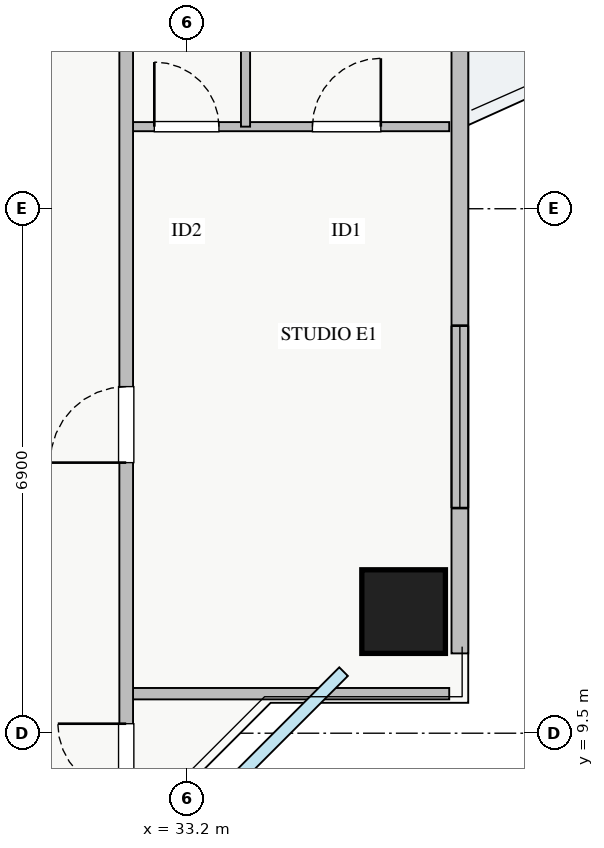
"""IFC4 building model, lengths in metres.
Left out: names, types, materials, properties, quantities, classifications, styles, units other than length and angle.
Written with IfcOpenShell. Run it as: python <this file> out.ifc"""

import sys

from ifc_helpers import new_model, si_unit, direction, frame, frame_2d, origin, origin_2d, place, context, subcontext, project, spatial, rectangle, extrude, source, transform, mapped, element, fill, save


model = new_model("IFC4")
c1 = context("Model", 3, precision=1e-05, world=origin(), true_north=direction((0.0, 1.0)))
c2 = subcontext(c1, "Body", "Model", "MODEL_VIEW")
j1 = project(units=[si_unit("LENGTHUNIT", "METRE"), si_unit("PLANEANGLEUNIT", "RADIAN")], contexts=[c1])
p1 = place(None, origin())
s1 = spatial("IfcSite", under=j1, at=p1, CompositionType="ELEMENT")
p2 = place(p1, origin())
s2 = spatial("IfcBuilding", under=s1, at=p2, CompositionType="ELEMENT")
p3 = place(p2, frame((0.0, 0.0, 136.0)))
s3 = spatial("IfcBuildingStorey", under=s2, at=p3, CompositionType="ELEMENT", Elevation=136.0)
m1 = source(origin(), c2, "Body", "SweptSolid", [
    extrude(rectangle(XDim=1.1, YDim=1.1, at=origin_2d()), origin(), (0.0, 0.0, 1.0), 3.25),
])
p4 = place(p3, frame((36.05, 11.1, 0.0), z_axis=(0.0, 0.0, 1.0), x_axis=(1.0, 0.0, 0.0)))
e1 = element("IfcColumn", 1, at=p4, inside=s3, PredefinedType="COLUMN", context=c2, shape_type="MappedRepresentation", body=[
    mapped(m1, transform((0.0, 0.0, 0.0), x_axis=(1.0, 0.0, 0.0), y_axis=(0.0, 1.0, 0.0), z_axis=(0.0, 0.0, 1.0), scale=1.0)),
])
p5 = place(p3, frame((36.79, 10.55, 0.0), z_axis=(0.0, 0.0, 1.0), x_axis=(0.0, 1.0, 0.0)))
e2 = element("IfcWall", 2, at=p5, inside=s3, PredefinedType="STANDARD", context=c2, shape_type="SweptSolid", body=[
    extrude(rectangle(XDim=24.9, YDim=0.22, at=frame_2d((12.45, 0.0))), origin(), (0.0, 0.0, 1.0), 2.57),
])
p6 = place(p5, frame((13.3, 0.0, 0.0)))
e3 = element("IfcOpeningElement", 3, at=p6, cuts=e2, PredefinedType="OPENING", context=c2, shape_type="SweptSolid", body=[
    extrude(rectangle(XDim=1.2, YDim=2.1, at=frame_2d((0.6, 1.05))), frame((0.0, 0.12, 0.0), z_axis=(0.0, -1.0, 0.0), x_axis=(1.0, 0.0, 0.0)), (0.0, 0.0, 1.0), 0.24),
])
p7 = place(p5, frame((1.912, 0.0, 0.9)))
e4 = element("IfcOpeningElement", 4, at=p7, cuts=e2, PredefinedType="OPENING", context=c2, shape_type="SweptSolid", body=[
    extrude(rectangle(XDim=2.4, YDim=1.48, at=frame_2d((1.2, 0.74))), frame((0.0, 0.12, 0.0), z_axis=(0.0, -1.0, 0.0), x_axis=(1.0, 0.0, 0.0)), (0.0, 0.0, 1.0), 0.24),
])
p8 = place(p5, frame((20.737, 0.0, 0.9)))
e5 = element("IfcOpeningElement", 5, at=p8, cuts=e2, PredefinedType="OPENING", context=c2, shape_type="SweptSolid", body=[
    extrude(rectangle(XDim=2.1, YDim=1.48, at=frame_2d((1.05, 0.74))), frame((0.0, 0.12, 0.0), z_axis=(0.0, -1.0, 0.0), x_axis=(1.0, 0.0, 0.0)), (0.0, 0.0, 1.0), 0.24),
])
p9 = place(p5, frame((14.72, 0.0, 0.9)))
e6 = element("IfcOpeningElement", 6, at=p9, cuts=e2, PredefinedType="OPENING", context=c2, shape_type="SweptSolid", body=[
    extrude(rectangle(XDim=0.9, YDim=1.2, at=frame_2d((0.45, 0.6))), frame((0.0, 0.12, 0.0), z_axis=(0.0, -1.0, 0.0), x_axis=(1.0, 0.0, 0.0)), (0.0, 0.0, 1.0), 0.24),
])
p10 = place(p3, frame((32.4, 10.02, 0.0), z_axis=(0.0, 0.0, 1.0), x_axis=(1.0, 0.0, 0.0)))
e7 = element("IfcWall", 7, at=p10, inside=s3, PredefinedType="PARTITIONING", context=c2, shape_type="SweptSolid", body=[
    extrude(rectangle(XDim=4.25, YDim=0.15, at=frame_2d((2.125, 0.0))), origin(), (0.0, 0.0, 1.0), 3.03),
])
p11 = place(p3, frame((32.4, 17.48, 0.0), z_axis=(0.0, 0.0, 1.0), x_axis=(1.0, 0.0, 0.0)))
e8 = element("IfcWall", 8, at=p11, inside=s3, PredefinedType="PLUMBINGWALL", context=c2, shape_type="SweptSolid", body=[
    extrude(rectangle(XDim=4.25, YDim=0.12, at=frame_2d((2.125, 0.0))), origin(), (0.0, 0.0, 1.0), 3.03),
])
p12 = place(p11, frame((0.37, 0.0, 0.0)))
e9 = element("IfcOpeningElement", 9, at=p12, cuts=e8, PredefinedType="OPENING", context=c2, shape_type="SweptSolid", body=[
    extrude(rectangle(XDim=0.85, YDim=2.05, at=frame_2d((0.425, 1.025))), frame((0.0, 0.07, 0.0), z_axis=(0.0, -1.0, 0.0), x_axis=(1.0, 0.0, 0.0)), (0.0, 0.0, 1.0), 0.14),
])
p13 = place(p11, frame((2.45, 0.0, 0.0)))
e10 = element("IfcOpeningElement", 10, at=p13, cuts=e8, PredefinedType="OPENING", context=c2, shape_type="SweptSolid", body=[
    extrude(rectangle(XDim=0.9, YDim=2.05, at=frame_2d((0.45, 1.025))), frame((0.0, 0.07, 0.0), z_axis=(0.0, -1.0, 0.0), x_axis=(1.0, 0.0, 0.0)), (0.0, 0.0, 1.0), 0.14),
])
p14 = place(p3, frame((33.97, 17.48, 0.0), z_axis=(0.0, 0.0, 1.0), x_axis=(0.0, 1.0, 0.0)))
e11 = element("IfcWall", 11, at=p14, inside=s3, PredefinedType="PLUMBINGWALL", context=c2, shape_type="SweptSolid", body=[
    extrude(rectangle(XDim=6.35, YDim=0.12, at=frame_2d((3.175, 0.0))), origin(), (0.0, 0.0, 1.0), 3.03),
])
p15 = place(p3, frame((32.4, 8.31, 0.0), z_axis=(0.0, 0.0, 1.0), x_axis=(0.0, 1.0, 0.0)))
e12 = element("IfcWall", 12, at=p15, inside=s3, PredefinedType="PARTITIONING", context=c2, shape_type="SweptSolid", body=[
    extrude(rectangle(XDim=29.13, YDim=0.18, at=frame_2d((14.565, 0.0))), origin(), (0.0, 0.0, 1.0), 3.03),
])
p16 = place(p15, frame((27.94, 0.0, 0.0)))
e13 = element("IfcOpeningElement", 13, at=p16, cuts=e12, PredefinedType="OPENING", context=c2, shape_type="SweptSolid", body=[
    extrude(rectangle(XDim=0.9, YDim=2.05, at=frame_2d((0.45, 1.025))), frame((0.0, 0.1, 0.0), z_axis=(0.0, -1.0, 0.0), x_axis=(1.0, 0.0, 0.0)), (0.0, 0.0, 1.0), 0.2),
])
p17 = place(p15, frame((0.415, 0.0, 0.0)))
e14 = element("IfcOpeningElement", 14, at=p17, cuts=e12, PredefinedType="OPENING", context=c2, shape_type="SweptSolid", body=[
    extrude(rectangle(XDim=0.9, YDim=2.05, at=frame_2d((0.45, 1.025))), frame((0.0, 0.1, 0.0), z_axis=(0.0, -1.0, 0.0), x_axis=(1.0, 0.0, 0.0)), (0.0, 0.0, 1.0), 0.2),
])
p18 = place(p15, frame((4.75, 0.0, 0.0)))
e15 = element("IfcOpeningElement", 15, at=p18, cuts=e12, PredefinedType="OPENING", context=c2, shape_type="SweptSolid", body=[
    extrude(rectangle(XDim=1.0, YDim=2.05, at=frame_2d((0.5, 1.025))), frame((0.0, 0.1, 0.0), z_axis=(0.0, -1.0, 0.0), x_axis=(1.0, 0.0, 0.0)), (0.0, 0.0, 1.0), 0.2),
])
p19 = place(p15, frame((18.11, 0.0, 0.0)))
e16 = element("IfcOpeningElement", 16, at=p19, cuts=e12, PredefinedType="OPENING", context=c2, shape_type="SweptSolid", body=[
    extrude(rectangle(XDim=1.0, YDim=2.05, at=frame_2d((0.5, 1.025))), frame((0.0, 0.1, 0.0), z_axis=(0.0, -1.0, 0.0), x_axis=(1.0, 0.0, 0.0)), (0.0, 0.0, 1.0), 0.2),
])
m2 = source(origin(), c2, "Body", "SweptSolid", [
    extrude(rectangle(XDim=2.4, YDim=1.48, at=frame_2d((1.2, 0.74))), frame((0.0, 0.03, 0.0), z_axis=(0.0, -1.0, 0.0), x_axis=(1.0, 0.0, 0.0)), (0.0, 0.0, 1.0), 0.06),
])
p20 = place(p7, origin())
e17 = element("IfcWindow", 17, at=p20, inside=s3, PartitioningType="TRIPLE_PANEL_VERTICAL", PredefinedType="WINDOW", context=c2, shape_type="MappedRepresentation", body=[
    mapped(m2, transform((0.0, 0.0, 0.0), x_axis=(1.0, 0.0, 0.0), y_axis=(0.0, 1.0, 0.0), z_axis=(0.0, 0.0, 1.0), scale=1.0)),
])
fill(e4, e17)
m3 = source(origin(), c2, "Body", "SweptSolid", [
    extrude(rectangle(XDim=0.85, YDim=2.05, at=frame_2d((0.425, 1.025))), frame((0.0, 0.025, 0.0), z_axis=(0.0, -1.0, 0.0), x_axis=(1.0, 0.0, 0.0)), (0.0, 0.0, 1.0), 0.05),
])
p21 = place(p12, origin())
e18 = element("IfcDoor", 18, at=p21, inside=s3, OperationType="SINGLE_SWING_LEFT", PredefinedType="DOOR", context=c2, shape_type="MappedRepresentation", body=[
    mapped(m3, transform((0.0, 0.0, 0.0), x_axis=(1.0, 0.0, 0.0), y_axis=(0.0, 1.0, 0.0), z_axis=(0.0, 0.0, 1.0), scale=1.0)),
])
fill(e9, e18)
m4 = source(origin(), c2, "Body", "SweptSolid", [
    extrude(rectangle(XDim=0.9, YDim=2.05, at=frame_2d((0.45, 1.025))), frame((0.0, 0.025, 0.0), z_axis=(0.0, -1.0, 0.0), x_axis=(1.0, 0.0, 0.0)), (0.0, 0.0, 1.0), 0.05),
])
p22 = place(p13, origin())
e19 = element("IfcDoor", 19, at=p22, inside=s3, OperationType="SINGLE_SWING_RIGHT", PredefinedType="DOOR", context=c2, shape_type="MappedRepresentation", body=[
    mapped(m4, transform((0.0, 0.0, 0.0), x_axis=(1.0, 0.0, 0.0), y_axis=(0.0, 1.0, 0.0), z_axis=(0.0, 0.0, 1.0), scale=1.0)),
])
fill(e10, e19)
p23 = place(p17, origin())
e20 = element("IfcDoor", 20, at=p23, inside=s3, OperationType="SINGLE_SWING_RIGHT", PredefinedType="DOOR", context=c2, shape_type="MappedRepresentation", body=[
    mapped(m4, transform((0.0, 0.0, 0.0), x_axis=(1.0, 0.0, 0.0), y_axis=(0.0, 1.0, 0.0), z_axis=(0.0, 0.0, 1.0), scale=1.0)),
])
fill(e14, e20)
m5 = source(origin(), c2, "Body", "SweptSolid", [
    extrude(rectangle(XDim=1.0, YDim=2.05, at=frame_2d((0.5, 1.025))), frame((0.0, 0.025, 0.0), z_axis=(0.0, -1.0, 0.0), x_axis=(1.0, 0.0, 0.0)), (0.0, 0.0, 1.0), 0.05),
])
p24 = place(p18, origin())
e21 = element("IfcDoor", 21, at=p24, inside=s3, OperationType="SINGLE_SWING_LEFT", PredefinedType="DOOR", context=c2, shape_type="MappedRepresentation", body=[
    mapped(m5, transform((0.0, 0.0, 0.0), x_axis=(1.0, 0.0, 0.0), y_axis=(0.0, 1.0, 0.0), z_axis=(0.0, 0.0, 1.0), scale=1.0)),
])
fill(e15, e21)
save(model, sys.argv[1])
